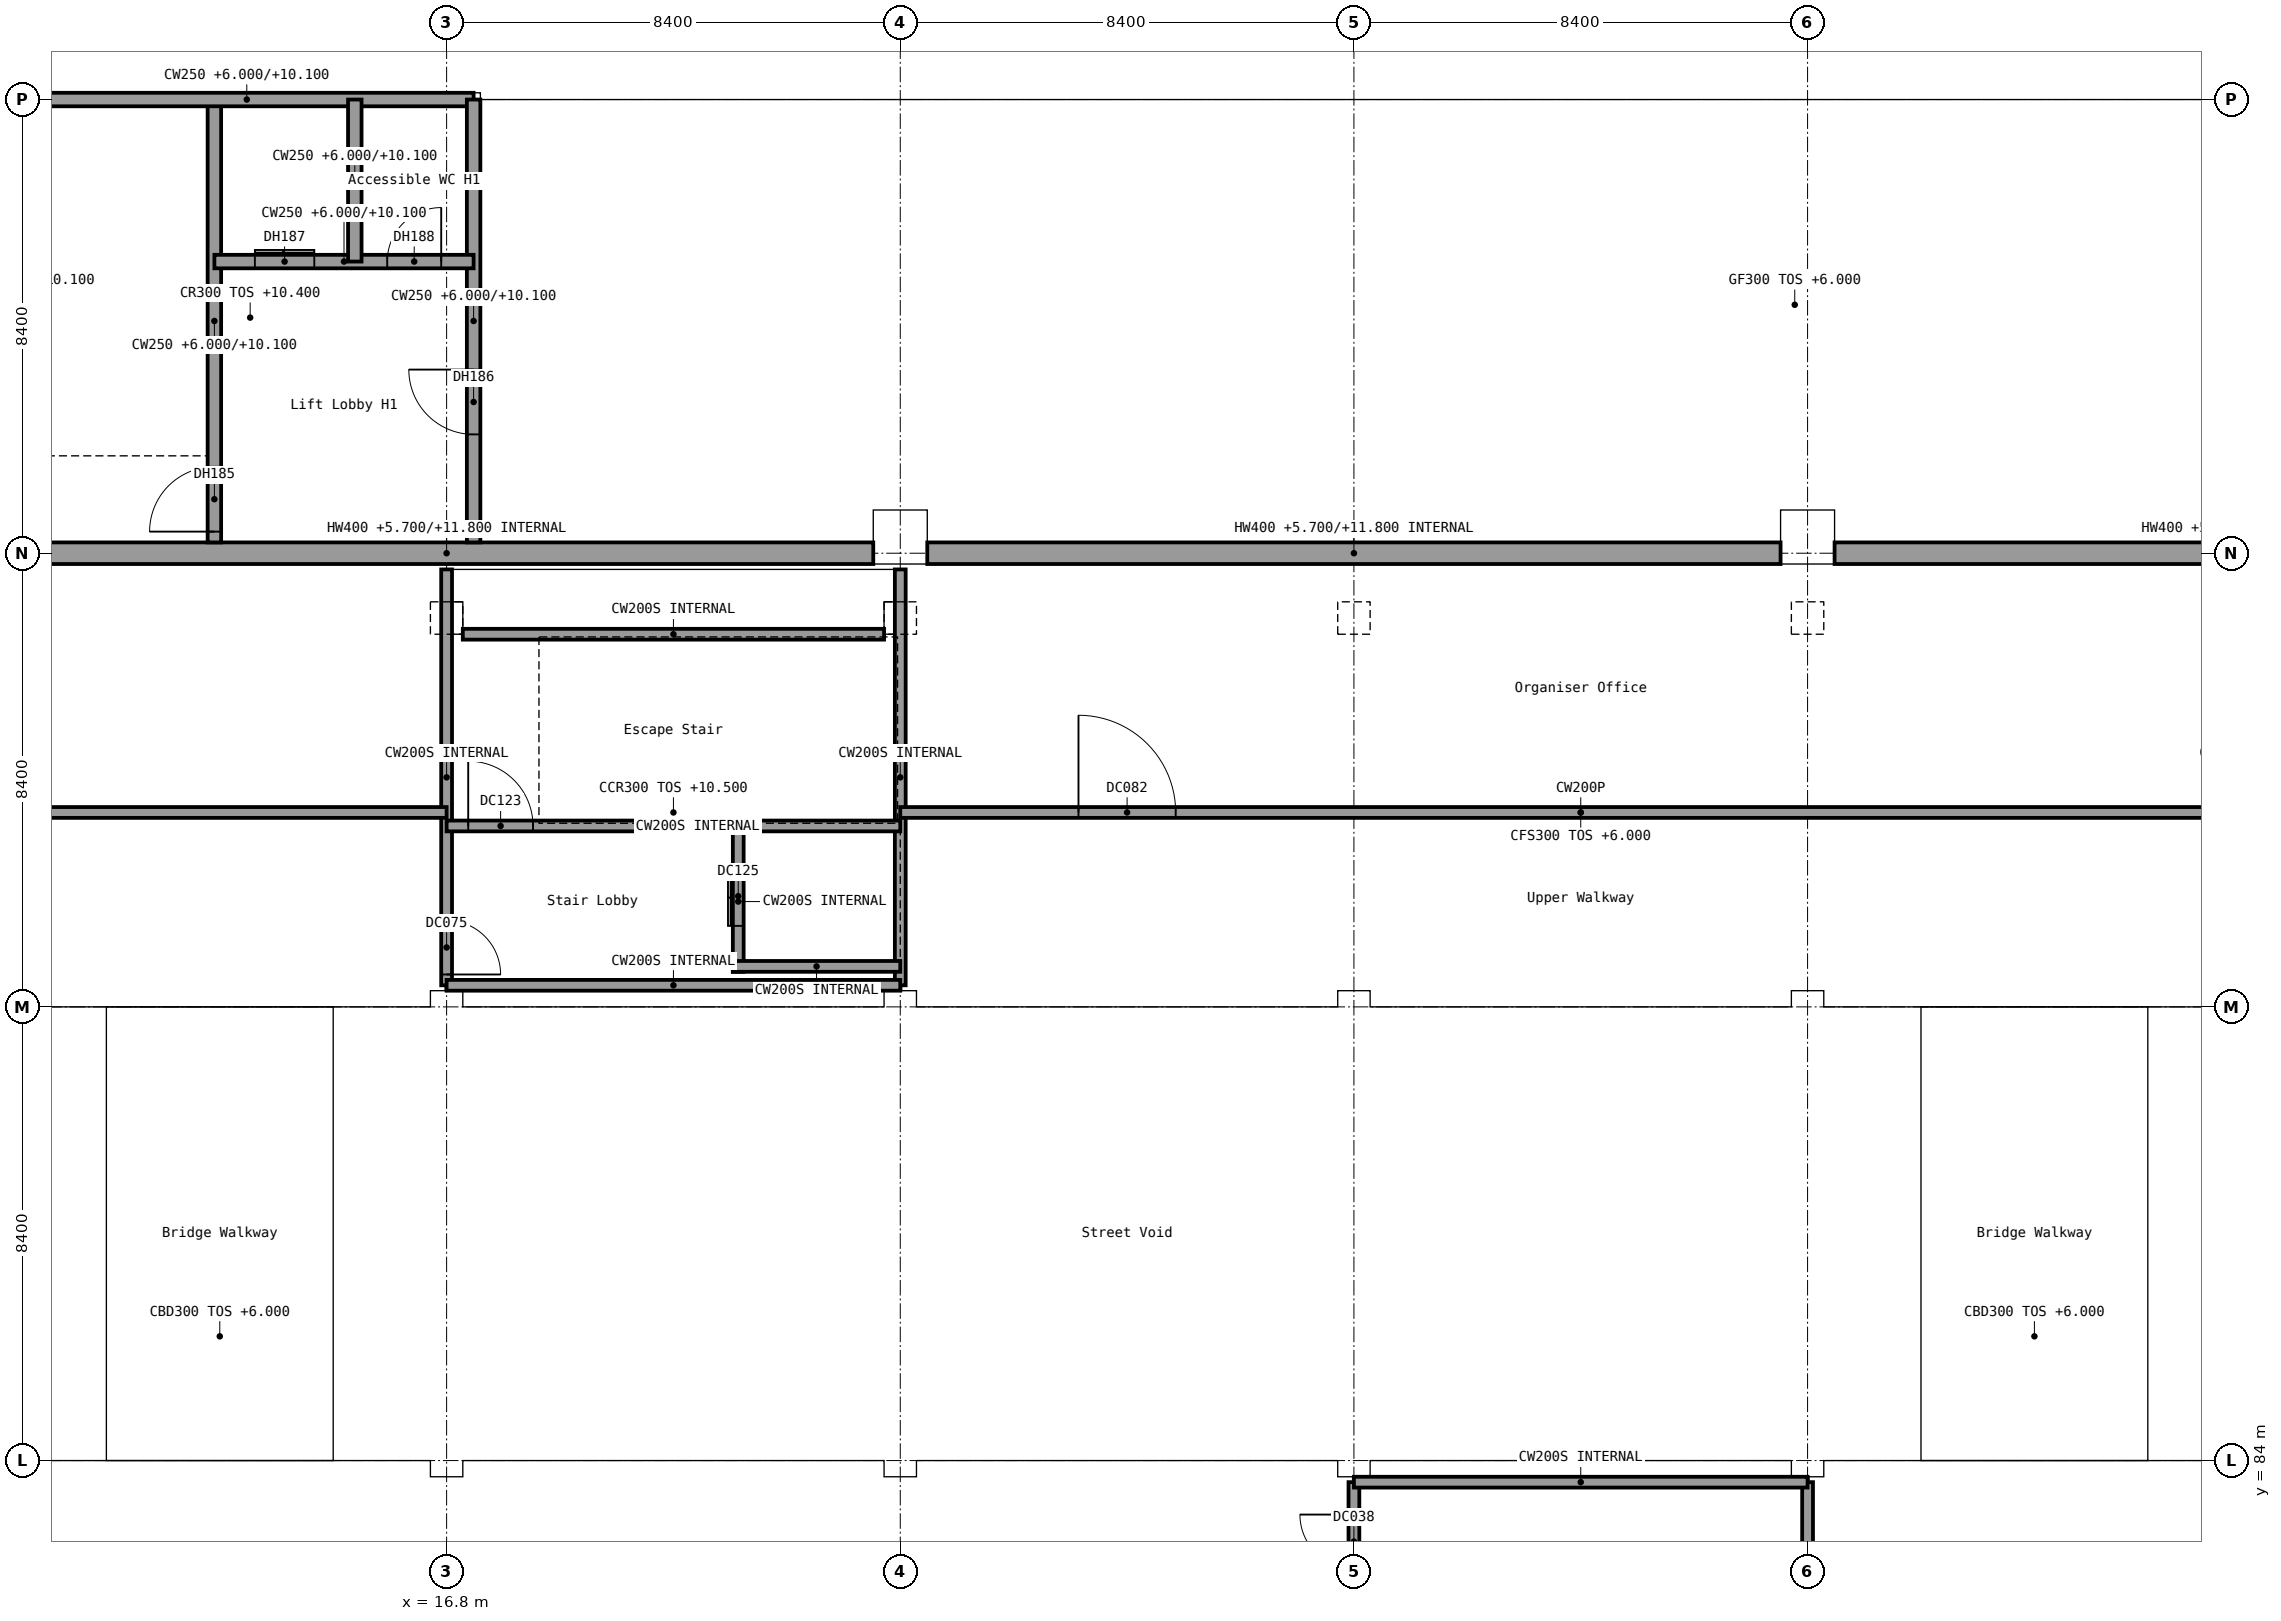
"""IFC4 building model, lengths in metres.
Left out: names, types, materials, properties, quantities, classifications, styles, units other than length and angle.
Written with IfcOpenShell. Run it as: python <this file> out.ifc"""

import sys

from ifc_helpers import new_model, si_unit, direction, frame, frame_2d, origin, origin_2d, place, context, subcontext, project, spatial, rectangle, extrude, element, fill, save


model = new_model("IFC4")
c1 = context("Model", 3, precision=1e-05, world=origin(), true_north=direction((0.0, 1.0)))
c2 = subcontext(c1, "Body", "Model", "MODEL_VIEW")
j1 = project(units=[si_unit("LENGTHUNIT", "METRE"), si_unit("PLANEANGLEUNIT", "RADIAN")], contexts=[c1])
p1 = place(None, origin())
s1 = spatial("IfcSite", under=j1, at=p1, CompositionType="ELEMENT")
p2 = place(p1, origin())
s2 = spatial("IfcBuilding", under=s1, at=p2, CompositionType="ELEMENT")
p3 = place(p2, frame((0.0, 0.0, 6.0)))
s3 = spatial("IfcBuildingStorey", under=s2, at=p3, CompositionType="ELEMENT", Elevation=6.0)
for number, where, z_axis, x_axis in (
    (1, (25.2, 100.8, 0.0), (0.0, 0.0, 1.0), (1.0, 0.0, 0.0)),
    (2, (42.0, 100.8, 0.0), (0.0, 0.0, 1.0), (1.0, 0.0, 0.0)),
):
    element("IfcColumn", number, at=place(p3, frame(where, z_axis=z_axis, x_axis=x_axis)), inside=s3, PredefinedType="COLUMN", context=c2, shape_type="SweptSolid", body=[
        extrude(rectangle(XDim=1.0, YDim=1.6, at=origin_2d()), origin(), (0.0, 0.0, 1.0), 4.5),
    ])
for number, where, z_axis, x_axis in (
    (3, (8.9, 100.8, -0.3), (0.0, 0.0, 1.0), (1.0, 0.0, 0.0)),
    (4, (25.7, 100.8, -0.3), (0.0, 0.0, 1.0), (1.0, 0.0, 0.0)),
    (5, (42.5, 100.8, -0.3), (0.0, 0.0, 1.0), (1.0, 0.0, 0.0)),
):
    element("IfcWall", number, at=place(p3, frame(where, z_axis=z_axis, x_axis=x_axis)), inside=s3, PredefinedType="STANDARD", context=c2, shape_type="SweptSolid", body=[
        extrude(rectangle(XDim=15.8, YDim=0.4, at=frame_2d((7.9, 0.0))), origin(), (0.0, 0.0, 1.0), 6.1),
    ])
p4 = place(p3, frame((12.5, 101.0, 0.0), z_axis=(0.0, 0.0, 1.0), x_axis=(0.0, 1.0, 0.0)))
e6 = element("IfcWall", 6, at=p4, inside=s3, PredefinedType="SHEAR", context=c2, shape_type="SweptSolid", body=[
    extrude(rectangle(XDim=8.2, YDim=0.25, at=frame_2d((4.1, 0.0))), origin(), (0.0, 0.0, 1.0), 4.1),
])
p5 = place(p4, frame((0.2, 0.0, 0.0)))
e7 = element("IfcOpeningElement", 7, at=p5, cuts=e6, PredefinedType="OPENING", context=c2, shape_type="SweptSolid", body=[
    extrude(rectangle(XDim=1.2, YDim=2.1, at=frame_2d((0.6, 1.05))), frame((0.0, 0.125, 0.0), z_axis=(0.0, -1.0, 0.0), x_axis=(1.0, 0.0, 0.0)), (0.0, 0.0, 1.0), 0.25),
])
p6 = place(p3, frame((8.9, 109.2, 0.0), z_axis=(0.0, 0.0, 1.0), x_axis=(1.0, 0.0, 0.0)))
e8 = element("IfcWall", 8, at=p6, inside=s3, PredefinedType="SHEAR", context=c2, shape_type="SweptSolid", body=[
    extrude(rectangle(XDim=8.4, YDim=0.25, at=frame_2d((4.2, 0.0))), origin(), (0.0, 0.0, 1.0), 4.1),
])
p7 = place(p3, frame((17.3, 101.0, 0.0), z_axis=(0.0, 0.0, 1.0), x_axis=(0.0, 1.0, 0.0)))
e9 = element("IfcWall", 9, at=p7, inside=s3, PredefinedType="SHEAR", context=c2, shape_type="SweptSolid", body=[
    extrude(rectangle(XDim=8.2, YDim=0.25, at=frame_2d((4.1, 0.0))), origin(), (0.0, 0.0, 1.0), 4.1),
])
p8 = place(p7, frame((2.0, 0.0, 0.0)))
e10 = element("IfcOpeningElement", 10, at=p8, cuts=e9, PredefinedType="OPENING", context=c2, shape_type="SweptSolid", body=[
    extrude(rectangle(XDim=1.2, YDim=2.1, at=frame_2d((0.6, 1.05))), frame((0.0, 0.125, 0.0), z_axis=(0.0, -1.0, 0.0), x_axis=(1.0, 0.0, 0.0)), (0.0, 0.0, 1.0), 0.25),
])
p9 = place(p3, frame((12.5, 106.2, 0.0), z_axis=(0.0, 0.0, 1.0), x_axis=(1.0, 0.0, 0.0)))
e11 = element("IfcWall", 11, at=p9, inside=s3, PredefinedType="SHEAR", context=c2, shape_type="SweptSolid", body=[
    extrude(rectangle(XDim=4.8, YDim=0.25, at=frame_2d((2.4, 0.0))), origin(), (0.0, 0.0, 1.0), 4.1),
])
p10 = place(p9, frame((0.75, 0.0, 0.0)))
e12 = element("IfcOpeningElement", 12, at=p10, cuts=e11, PredefinedType="OPENING", context=c2, shape_type="SweptSolid", body=[
    extrude(rectangle(XDim=1.1, YDim=2.1, at=frame_2d((0.55, 1.05))), frame((0.0, 0.125, 0.0), z_axis=(0.0, -1.0, 0.0), x_axis=(1.0, 0.0, 0.0)), (0.0, 0.0, 1.0), 0.25),
])
p11 = place(p9, frame((3.2, 0.0, 0.0)))
e13 = element("IfcOpeningElement", 13, at=p11, cuts=e11, PredefinedType="OPENING", context=c2, shape_type="SweptSolid", body=[
    extrude(rectangle(XDim=1.0, YDim=2.1, at=frame_2d((0.5, 1.05))), frame((0.0, 0.125, 0.0), z_axis=(0.0, -1.0, 0.0), x_axis=(1.0, 0.0, 0.0)), (0.0, 0.0, 1.0), 0.25),
])
p12 = place(p3, frame((15.1, 106.2, 0.0), z_axis=(0.0, 0.0, 1.0), x_axis=(0.0, 1.0, 0.0)))
e14 = element("IfcWall", 14, at=p12, inside=s3, PredefinedType="SHEAR", context=c2, shape_type="SweptSolid", body=[
    extrude(rectangle(XDim=3.0, YDim=0.25, at=frame_2d((1.5, 0.0))), origin(), (0.0, 0.0, 1.0), 4.1),
])
for number, where, z_axis, x_axis in (
    (15, (16.8, 99.6, 0.0), (0.0, 0.0, 1.0), (1.0, 0.0, 0.0)),
    (16, (25.2, 99.6, 0.0), (0.0, 0.0, 1.0), (1.0, 0.0, 0.0)),
    (17, (33.6, 99.6, 0.0), (0.0, 0.0, 1.0), (1.0, 0.0, 0.0)),
    (18, (42.0, 99.6, 0.0), (0.0, 0.0, 1.0), (1.0, 0.0, 0.0)),
):
    element("IfcColumn", number, at=place(p3, frame(where, z_axis=z_axis, x_axis=x_axis)), inside=s3, PredefinedType="COLUMN", context=c2, shape_type="SweptSolid", body=[
        extrude(rectangle(XDim=0.6, YDim=0.6, at=origin_2d()), origin(), (0.0, 0.0, 1.0), 4.5),
    ])
p13 = place(p3, frame((33.6, 75.4, 0.0), z_axis=(0.0, 0.0, 1.0), x_axis=(0.0, 1.0, 0.0)))
e19 = element("IfcWall", 19, at=p13, inside=s3, PredefinedType="SOLIDWALL", context=c2, shape_type="SweptSolid", body=[
    extrude(rectangle(XDim=8.2, YDim=0.2, at=frame_2d((4.1, 0.0))), origin(), (0.0, 0.0, 1.0), 4.2),
])
p14 = place(p13, frame((6.6, 0.0, 0.0)))
e20 = element("IfcOpeningElement", 20, at=p14, cuts=e19, PredefinedType="OPENING", context=c2, shape_type="SweptSolid", body=[
    extrude(rectangle(XDim=1.0, YDim=2.4, at=frame_2d((0.5, 1.2))), frame((0.0, 0.1, 0.0), z_axis=(0.0, -1.0, 0.0), x_axis=(1.0, 0.0, 0.0)), (0.0, 0.0, 1.0), 0.2),
])
p15 = place(p3, frame((42.0, 75.4, 0.0), z_axis=(0.0, 0.0, 1.0), x_axis=(0.0, 1.0, 0.0)))
e21 = element("IfcWall", 21, at=p15, inside=s3, PredefinedType="SOLIDWALL", context=c2, shape_type="SweptSolid", body=[
    extrude(rectangle(XDim=8.2, YDim=0.2, at=frame_2d((4.1, 0.0))), origin(), (0.0, 0.0, 1.0), 4.2),
])
p16 = place(p3, frame((33.6, 83.6, 0.0), z_axis=(0.0, 0.0, 1.0), x_axis=(1.0, 0.0, 0.0)))
e22 = element("IfcWall", 22, at=p16, inside=s3, PredefinedType="SOLIDWALL", context=c2, shape_type="SweptSolid", body=[
    extrude(rectangle(XDim=8.4, YDim=0.2, at=frame_2d((4.2, 0.0))), origin(), (0.0, 0.0, 1.0), 4.2),
])
p17 = place(p3, frame((16.8, 100.5, 0.0), z_axis=(0.0, 0.0, 1.0), x_axis=(0.0, -1.0, 0.0)))
e23 = element("IfcWall", 23, at=p17, inside=s3, PredefinedType="SOLIDWALL", context=c2, shape_type="SweptSolid", body=[
    extrude(rectangle(XDim=7.7, YDim=0.2, at=frame_2d((3.85, 0.0))), origin(), (0.0, 0.0, 1.0), 4.2),
])
p18 = place(p17, frame((6.5, 0.0, 0.0)))
e24 = element("IfcOpeningElement", 24, at=p18, cuts=e23, PredefinedType="OPENING", context=c2, shape_type="SweptSolid", body=[
    extrude(rectangle(XDim=1.0, YDim=2.4, at=frame_2d((0.5, 1.2))), frame((0.0, 0.1, 0.0), z_axis=(0.0, -1.0, 0.0), x_axis=(1.0, 0.0, 0.0)), (0.0, 0.0, 1.0), 0.2),
])
p19 = place(p3, frame((25.2, 100.5, 0.0), z_axis=(0.0, 0.0, 1.0), x_axis=(0.0, -1.0, 0.0)))
e25 = element("IfcWall", 25, at=p19, inside=s3, PredefinedType="SOLIDWALL", context=c2, shape_type="SweptSolid", body=[
    extrude(rectangle(XDim=7.7, YDim=0.2, at=frame_2d((3.85, 0.0))), origin(), (0.0, 0.0, 1.0), 4.2),
])
p20 = place(p3, frame((0.0, 96.0, 0.0), z_axis=(0.0, 0.0, 1.0), x_axis=(1.0, 0.0, 0.0)))
e26 = element("IfcWall", 26, at=p20, inside=s3, PredefinedType="PARTITIONING", context=c2, shape_type="SweptSolid", body=[
    extrude(rectangle(XDim=16.8, YDim=0.2, at=frame_2d((8.4, 0.0))), origin(), (0.0, 0.0, 1.0), 4.5),
])
p21 = place(p20, frame((3.3, 0.0, 0.0)))
e27 = element("IfcOpeningElement", 27, at=p21, cuts=e26, PredefinedType="OPENING", context=c2, shape_type="SweptSolid", body=[
    extrude(rectangle(XDim=1.8, YDim=2.4, at=frame_2d((0.9, 1.2))), frame((0.0, 0.1, 0.0), z_axis=(0.0, -1.0, 0.0), x_axis=(1.0, 0.0, 0.0)), (0.0, 0.0, 1.0), 0.2),
])
p22 = place(p3, frame((25.2, 96.0, 0.0), z_axis=(0.0, 0.0, 1.0), x_axis=(1.0, 0.0, 0.0)))
e28 = element("IfcWall", 28, at=p22, inside=s3, PredefinedType="PARTITIONING", context=c2, shape_type="SweptSolid", body=[
    extrude(rectangle(XDim=25.2, YDim=0.2, at=frame_2d((12.6, 0.0))), origin(), (0.0, 0.0, 1.0), 4.5),
])
p23 = place(p22, frame((3.3, 0.0, 0.0)))
e29 = element("IfcOpeningElement", 29, at=p23, cuts=e28, PredefinedType="OPENING", context=c2, shape_type="SweptSolid", body=[
    extrude(rectangle(XDim=1.8, YDim=2.4, at=frame_2d((0.9, 1.2))), frame((0.0, 0.1, 0.0), z_axis=(0.0, -1.0, 0.0), x_axis=(1.0, 0.0, 0.0)), (0.0, 0.0, 1.0), 0.2),
])
p24 = place(p3, frame((16.8, 92.8, 0.0), z_axis=(0.0, 0.0, 1.0), x_axis=(1.0, 0.0, 0.0)))
e30 = element("IfcWall", 30, at=p24, inside=s3, PredefinedType="SOLIDWALL", context=c2, shape_type="SweptSolid", body=[
    extrude(rectangle(XDim=8.4, YDim=0.2, at=frame_2d((4.2, 0.0))), origin(), (0.0, 0.0, 1.0), 4.2),
])
p25 = place(p3, frame((17.1, 99.3, 0.0), z_axis=(0.0, 0.0, 1.0), x_axis=(1.0, 0.0, 0.0)))
e31 = element("IfcWall", 31, at=p25, inside=s3, PredefinedType="SOLIDWALL", context=c2, shape_type="SweptSolid", body=[
    extrude(rectangle(XDim=7.8, YDim=0.2, at=frame_2d((3.9, 0.0))), origin(), (0.0, 0.0, 1.0), 4.2),
])
p26 = place(p3, frame((16.8, 95.75, 0.0), z_axis=(0.0, 0.0, 1.0), x_axis=(1.0, 0.0, 0.0)))
e32 = element("IfcWall", 32, at=p26, inside=s3, PredefinedType="SOLIDWALL", context=c2, shape_type="SweptSolid", body=[
    extrude(rectangle(XDim=8.4, YDim=0.2, at=frame_2d((4.2, 0.0))), origin(), (0.0, 0.0, 1.0), 4.2),
])
p27 = place(p26, frame((0.4, 0.0, 0.0)))
e33 = element("IfcOpeningElement", 33, at=p27, cuts=e32, PredefinedType="OPENING", context=c2, shape_type="SweptSolid", body=[
    extrude(rectangle(XDim=1.2, YDim=2.4, at=frame_2d((0.6, 1.2))), frame((0.0, 0.1, 0.0), z_axis=(0.0, -1.0, 0.0), x_axis=(1.0, 0.0, 0.0)), (0.0, 0.0, 1.0), 0.2),
])
p28 = place(p3, frame((22.2, 93.05, 0.0), z_axis=(0.0, 0.0, 1.0), x_axis=(0.0, 1.0, 0.0)))
e34 = element("IfcWall", 34, at=p28, inside=s3, PredefinedType="SOLIDWALL", context=c2, shape_type="SweptSolid", body=[
    extrude(rectangle(XDim=2.6, YDim=0.2, at=frame_2d((1.3, 0.0))), origin(), (0.0, 0.0, 1.0), 4.2),
])
p29 = place(p28, frame((0.85, 0.0, 0.0)))
e35 = element("IfcOpeningElement", 35, at=p29, cuts=e34, PredefinedType="OPENING", context=c2, shape_type="SweptSolid", body=[
    extrude(rectangle(XDim=1.1, YDim=2.1, at=frame_2d((0.55, 1.05))), frame((0.0, 0.1, 0.0), z_axis=(0.0, -1.0, 0.0), x_axis=(1.0, 0.0, 0.0)), (0.0, 0.0, 1.0), 0.2),
])
p30 = place(p3, frame((22.1, 93.15, 0.0), z_axis=(0.0, 0.0, 1.0), x_axis=(1.0, 0.0, 0.0)))
e36 = element("IfcWall", 36, at=p30, inside=s3, PredefinedType="SOLIDWALL", context=c2, shape_type="SweptSolid", body=[
    extrude(rectangle(XDim=3.1, YDim=0.2, at=frame_2d((1.55, 0.0))), origin(), (0.0, 0.0, 1.0), 4.2),
])
p31 = place(p5, origin())
e37 = element("IfcDoor", 37, at=p31, inside=s3, OperationType="SINGLE_SWING_LEFT", PredefinedType="DOOR", context=c2, shape_type="SweptSolid", body=[
    extrude(rectangle(XDim=1.2, YDim=2.1, at=frame_2d((0.6, 1.05))), frame((0.0, 0.025, 0.0), z_axis=(0.0, -1.0, 0.0), x_axis=(1.0, 0.0, 0.0)), (0.0, 0.0, 1.0), 0.05),
])
fill(e7, e37)
p32 = place(p8, origin())
e38 = element("IfcDoor", 38, at=p32, inside=s3, OperationType="SINGLE_SWING_LEFT", PredefinedType="DOOR", context=c2, shape_type="SweptSolid", body=[
    extrude(rectangle(XDim=1.2, YDim=2.1, at=frame_2d((0.6, 1.05))), frame((0.0, 0.025, 0.0), z_axis=(0.0, -1.0, 0.0), x_axis=(1.0, 0.0, 0.0)), (0.0, 0.0, 1.0), 0.05),
])
fill(e10, e38)
p33 = place(p10, origin())
e39 = element("IfcDoor", 39, at=p33, inside=s3, OperationType="DOUBLE_DOOR_SLIDING", PredefinedType="DOOR", context=c2, shape_type="SweptSolid", body=[
    extrude(rectangle(XDim=1.1, YDim=2.1, at=frame_2d((0.55, 1.05))), frame((0.0, 0.025, 0.0), z_axis=(0.0, -1.0, 0.0), x_axis=(1.0, 0.0, 0.0)), (0.0, 0.0, 1.0), 0.05),
])
fill(e12, e39)
p34 = place(p11, origin())
e40 = element("IfcDoor", 40, at=p34, inside=s3, OperationType="SINGLE_SWING_RIGHT", PredefinedType="DOOR", context=c2, shape_type="SweptSolid", body=[
    extrude(rectangle(XDim=1.0, YDim=2.1, at=frame_2d((0.5, 1.05))), frame((0.0, 0.025, 0.0), z_axis=(0.0, -1.0, 0.0), x_axis=(1.0, 0.0, 0.0)), (0.0, 0.0, 1.0), 0.05),
])
fill(e13, e40)
p35 = place(p14, origin())
e41 = element("IfcDoor", 41, at=p35, inside=s3, OperationType="SINGLE_SWING_RIGHT", PredefinedType="DOOR", context=c2, shape_type="SweptSolid", body=[
    extrude(rectangle(XDim=1.0, YDim=2.4, at=frame_2d((0.5, 1.2))), frame((0.0, 0.025, 0.0), z_axis=(0.0, -1.0, 0.0), x_axis=(1.0, 0.0, 0.0)), (0.0, 0.0, 1.0), 0.05),
])
fill(e20, e41)
p36 = place(p18, origin())
e42 = element("IfcDoor", 42, at=p36, inside=s3, OperationType="SINGLE_SWING_RIGHT", PredefinedType="DOOR", context=c2, shape_type="SweptSolid", body=[
    extrude(rectangle(XDim=1.0, YDim=2.4, at=frame_2d((0.5, 1.2))), frame((0.0, 0.025, 0.0), z_axis=(0.0, -1.0, 0.0), x_axis=(1.0, 0.0, 0.0)), (0.0, 0.0, 1.0), 0.05),
])
fill(e24, e42)
p37 = place(p23, origin())
e43 = element("IfcDoor", 43, at=p37, inside=s3, OperationType="DOUBLE_DOOR_DOUBLE_SWING", PredefinedType="DOOR", context=c2, shape_type="SweptSolid", body=[
    extrude(rectangle(XDim=1.8, YDim=2.4, at=frame_2d((0.9, 1.2))), frame((0.0, 0.025, 0.0), z_axis=(0.0, -1.0, 0.0), x_axis=(1.0, 0.0, 0.0)), (0.0, 0.0, 1.0), 0.05),
])
fill(e29, e43)
p38 = place(p27, origin())
e44 = element("IfcDoor", 44, at=p38, inside=s3, OperationType="SINGLE_SWING_LEFT", PredefinedType="DOOR", context=c2, shape_type="SweptSolid", body=[
    extrude(rectangle(XDim=1.2, YDim=2.4, at=frame_2d((0.6, 1.2))), frame((0.0, 0.025, 0.0), z_axis=(0.0, -1.0, 0.0), x_axis=(1.0, 0.0, 0.0)), (0.0, 0.0, 1.0), 0.05),
])
fill(e33, e44)
p39 = place(p29, origin())
e45 = element("IfcDoor", 45, at=p39, inside=s3, OperationType="DOUBLE_DOOR_SLIDING", PredefinedType="DOOR", context=c2, shape_type="SweptSolid", body=[
    extrude(rectangle(XDim=1.1, YDim=2.1, at=frame_2d((0.55, 1.05))), frame((0.0, 0.025, 0.0), z_axis=(0.0, -1.0, 0.0), x_axis=(1.0, 0.0, 0.0)), (0.0, 0.0, 1.0), 0.05),
])
fill(e35, e45)
save(model, sys.argv[1])
